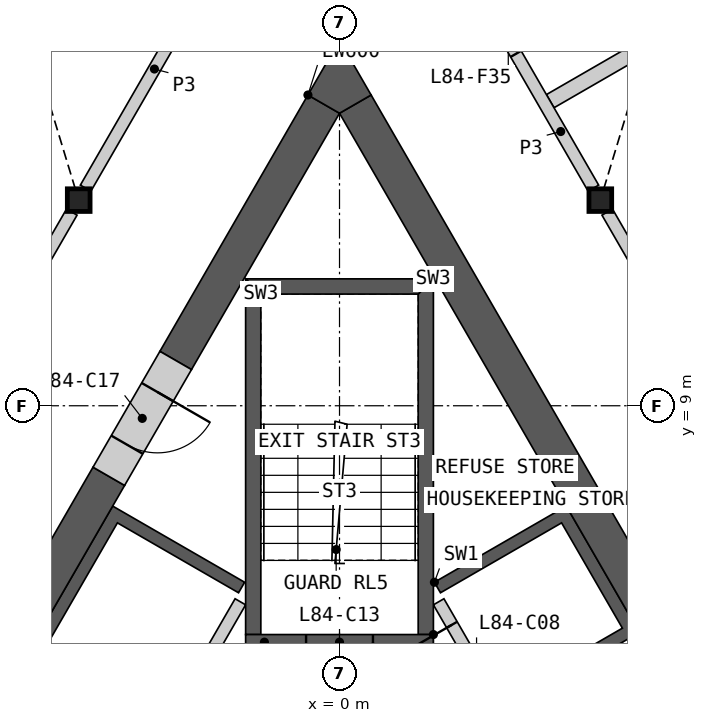
"""IFC4 building model, lengths in metres.
Left out: names, types, materials, properties, quantities, classifications, styles, units other than length and angle.
Written with IfcOpenShell. Run it as: python <this file> out.ifc"""

import sys

from ifc_helpers import new_model, si_unit, direction, frame, frame_2d, origin, origin_2d, place, context, subcontext, project, spatial, polyline, rectangle, i_section, outline, extrude, element, fill, save


model = new_model("IFC4")
c1 = context("Model", 3, precision=1e-05, world=origin(), true_north=direction((0.0, 1.0)))
c2 = subcontext(c1, "Body", "Model", "MODEL_VIEW")
j1 = project(units=[si_unit("LENGTHUNIT", "METRE"), si_unit("PLANEANGLEUNIT", "RADIAN")], contexts=[c1])
p1 = place(None, origin())
s1 = spatial("IfcSite", under=j1, at=p1, CompositionType="ELEMENT")
p2 = place(p1, origin())
s2 = spatial("IfcBuilding", under=s1, at=p2, CompositionType="ELEMENT")
p3 = place(p2, frame((0.0, 0.0, 374.6)))
s3 = spatial("IfcBuildingStorey", under=s2, at=p3, CompositionType="ELEMENT", Elevation=374.6)
for number, where, z_axis, x_axis in (
    (1, (-4.289, 12.382, 0.0), (0.0, 0.0, 1.0), (1.0, 0.0, 0.0)),
    (2, (4.289, 12.382, 0.0), (0.0, 0.0, 1.0), (1.0, 0.0, 0.0)),
):
    element("IfcColumn", number, at=place(p3, frame(where, z_axis=z_axis, x_axis=x_axis)), inside=s3, PredefinedType="COLUMN", context=c2, shape_type="SweptSolid", body=[
        extrude(i_section(OverallWidth=0.374, OverallDepth=0.372, WebThickness=0.016, FlangeThickness=0.026, at=origin_2d()), origin(), (0.0, 0.0, 1.0), 3.4),
    ])
p4 = place(p3, origin())
e3 = element("IfcWall", 3, at=p4, inside=s3, PredefinedType="SHEAR", context=c2, shape_type="SweptSolid", body=[
    extrude(outline(polyline([(1.561, 6.097), (3.731, 7.35), (8.231, -0.444), (6.061, -1.697), (5.96, -1.524), (7.952, -0.374), (6.952, 1.358), (4.96, 0.208), (4.861, 0.381), (6.852, 1.531), (5.852, 3.263), (3.861, 2.113), (3.76, 2.287), (5.752, 3.437), (4.752, 5.169), (2.76, 4.019), (2.66, 4.192), (4.652, 5.342), (3.652, 7.074), (1.66, 5.924), (1.561, 6.097)])), origin(), (0.0, 0.0, 1.0), 3.1),
])
p5 = place(p3, frame((5.817, -1.476, 0.0), z_axis=(0.0, 0.0, 1.0), x_axis=(-0.500002616675, 0.866023893041, 0.0)))
e4 = element("IfcWall", 4, at=p5, inside=s3, PredefinedType="SOLIDWALL", context=c2, shape_type="SweptSolid", body=[
    extrude(rectangle(XDim=8.373, YDim=0.2, at=frame_2d((4.187, 0.0))), origin(), (0.0, 0.0, 1.0), 3.1),
])
p6 = place(p5, frame((0.337, 0.0, 0.0)))
e5 = element("IfcOpeningElement", 5, at=p6, cuts=e4, PredefinedType="OPENING", context=c2, shape_type="SweptSolid", body=[
    extrude(rectangle(XDim=1.1, YDim=2.1, at=frame_2d((0.55, 1.05))), frame((0.0, 0.11, 0.0), z_axis=(0.0, -1.0, 0.0), x_axis=(1.0, 0.0, 0.0)), (0.0, 0.0, 1.0), 0.22),
])
p7 = place(p5, frame((2.537, 0.0, 0.0)))
e6 = element("IfcOpeningElement", 6, at=p7, cuts=e4, PredefinedType="OPENING", context=c2, shape_type="SweptSolid", body=[
    extrude(rectangle(XDim=1.1, YDim=2.1, at=frame_2d((0.55, 1.05))), frame((0.0, 0.11, 0.0), z_axis=(0.0, -1.0, 0.0), x_axis=(1.0, 0.0, 0.0)), (0.0, 0.0, 1.0), 0.22),
])
p8 = place(p5, frame((4.737, 0.0, 0.0)))
e7 = element("IfcOpeningElement", 7, at=p8, cuts=e4, PredefinedType="OPENING", context=c2, shape_type="SweptSolid", body=[
    extrude(rectangle(XDim=1.1, YDim=2.1, at=frame_2d((0.55, 1.05))), frame((0.0, 0.11, 0.0), z_axis=(0.0, -1.0, 0.0), x_axis=(1.0, 0.0, 0.0)), (0.0, 0.0, 1.0), 0.22),
])
p9 = place(p5, frame((7.037, 0.0, 0.0)))
e8 = element("IfcOpeningElement", 8, at=p9, cuts=e4, PredefinedType="OPENING", context=c2, shape_type="SweptSolid", body=[
    extrude(rectangle(XDim=0.9, YDim=2.1, at=frame_2d((0.45, 1.05))), frame((0.0, 0.11, 0.0), z_axis=(0.0, -1.0, 0.0), x_axis=(1.0, 0.0, 0.0)), (0.0, 0.0, 1.0), 0.22),
])
p10 = place(p3, origin())
e9 = element("IfcWall", 9, at=p10, inside=s3, PredefinedType="SHEAR", context=c2, shape_type="SweptSolid", body=[
    extrude(outline(polyline([(-4.96, 0.208), (-7.131, 1.461), (-3.731, 7.35), (-1.561, 6.097), (-1.66, 5.924), (-3.652, 7.074), (-6.852, 1.531), (-4.861, 0.381), (-4.96, 0.208)])), origin(), (0.0, 0.0, 1.0), 3.1),
])
p11 = place(p3, frame((-1.631, 5.776, 0.0), z_axis=(0.0, 0.0, 1.0), x_axis=(-0.499992876559, -0.866029516466, 0.0)))
e10 = element("IfcWall", 10, at=p11, inside=s3, PredefinedType="SOLIDWALL", context=c2, shape_type="SweptSolid", body=[
    extrude(rectangle(XDim=6.486, YDim=0.2, at=frame_2d((3.243, 0.0))), origin(), (0.0, 0.0, 1.0), 3.1),
])
p12 = place(p11, frame((2.637, 0.0, 0.0)))
e11 = element("IfcOpeningElement", 11, at=p12, cuts=e10, PredefinedType="OPENING", context=c2, shape_type="SweptSolid", body=[
    extrude(rectangle(XDim=0.9, YDim=2.1, at=frame_2d((0.45, 1.05))), frame((0.0, 0.11, 0.0), z_axis=(0.0, -1.0, 0.0), x_axis=(1.0, 0.0, 0.0)), (0.0, 0.0, 1.0), 0.22),
])
p13 = place(p3, origin())
e12 = element("IfcWall", 12, at=p13, inside=s3, PredefinedType="SHEAR", context=c2, shape_type="SweptSolid", body=[
    extrude(outline(polyline([(1.544, 5.237), (1.544, 11.087), (1.294, 10.837), (1.294, 5.237), (1.544, 5.237)])), origin(), (0.0, 0.0, 1.0), 3.1),
])
p14 = place(p3, origin())
e13 = element("IfcWall", 13, at=p14, inside=s3, PredefinedType="SHEAR", context=c2, shape_type="SweptSolid", body=[
    extrude(outline(polyline([(1.544, 11.087), (-1.544, 11.087), (-1.294, 10.837), (1.294, 10.837), (1.544, 11.087)])), origin(), (0.0, 0.0, 1.0), 3.1),
])
p15 = place(p3, origin())
e14 = element("IfcWall", 14, at=p15, inside=s3, PredefinedType="SHEAR", context=c2, shape_type="SweptSolid", body=[
    extrude(outline(polyline([(-1.294, 10.837), (-1.544, 11.087), (-1.544, 5.237), (-1.294, 5.237), (-1.294, 10.837)])), origin(), (0.0, 0.0, 1.0), 3.1),
])
p16 = place(p3, frame((1.544, 5.112, 0.0), z_axis=(0.0, 0.0, 1.0), x_axis=(-1.0, 0.0, 0.0)))
e15 = element("IfcWall", 15, at=p16, inside=s3, PredefinedType="SHEAR", context=c2, shape_type="SweptSolid", body=[
    extrude(rectangle(XDim=3.088, YDim=0.25, at=frame_2d((1.544, 0.0))), origin(), (0.0, 0.0, 1.0), 3.1),
])
p17 = place(p16, frame((0.994, 0.0, 0.0)))
e16 = element("IfcOpeningElement", 16, at=p17, cuts=e15, PredefinedType="OPENING", context=c2, shape_type="SweptSolid", body=[
    extrude(rectangle(XDim=1.1, YDim=2.1, at=frame_2d((0.55, 1.05))), frame((0.0, 0.135, 0.0), z_axis=(0.0, -1.0, 0.0), x_axis=(1.0, 0.0, 0.0)), (0.0, 0.0, 1.0), 0.27),
])
p18 = place(p3, frame((8.686, -0.634, 0.0), z_axis=(0.0, 0.0, 1.0), x_axis=(-0.500004601921, 0.866022746848, 0.0)))
e17 = element("IfcWall", 17, at=p18, inside=s3, PredefinedType="SHEAR", context=c2, shape_type="SweptSolid", body=[
    extrude(rectangle(XDim=16.853, YDim=0.6, at=frame_2d((8.426, 0.0))), origin(), (0.0, 0.0, 1.0), 3.1),
])
p19 = place(p3, frame((-3.794, 7.84, 0.0), z_axis=(0.0, 0.0, 1.0), x_axis=(-0.499974747889, -0.866039982607, 0.0)))
e18 = element("IfcWall", 18, at=p19, inside=s3, PredefinedType="SHEAR", context=c2, shape_type="SweptSolid", body=[
    extrude(rectangle(XDim=7.092, YDim=0.6, at=frame_2d((3.546, 0.0))), origin(), (0.0, 0.0, 1.0), 3.1),
])
p20 = place(p3, frame((-0.26, 13.961, 0.0), z_axis=(0.0, 0.0, 1.0), x_axis=(-0.50000604952, -0.866021911064, 0.0)))
e19 = element("IfcWall", 19, at=p20, inside=s3, PredefinedType="SHEAR", context=c2, shape_type="SweptSolid", body=[
    extrude(rectangle(XDim=4.869, YDim=0.6, at=frame_2d((2.434, 0.0))), origin(), (0.0, 0.0, 1.0), 3.1),
])
p21 = place(p3, origin())
e20 = element("IfcWall", 20, at=p21, inside=s3, PredefinedType="SHEAR", context=c2, shape_type="SweptSolid", body=[
    extrude(outline(polyline([(-0.52, 14.111), (0.0, 15.011), (0.52, 14.111), (0.0, 13.811), (-0.52, 14.111)])), origin(), (0.0, 0.0, 1.0), 3.1),
])
p22 = place(p3, frame((-2.694, 9.745, 0.0), z_axis=(0.0, 0.0, 1.0), x_axis=(-0.50002983664, -0.866008176907, 0.0)))
e21 = element("IfcWall", 21, at=p22, inside=s3, PredefinedType="SHEAR", context=c2, shape_type="SweptSolid", body=[
    extrude(rectangle(XDim=2.2, YDim=0.6, at=frame_2d((1.1, 0.0))), origin(), (0.0, 0.0, 1.0), 3.1),
])
p23 = place(p22, frame((0.6, 0.0, 0.0)))
e22 = element("IfcOpeningElement", 22, at=p23, cuts=e21, PredefinedType="OPENING", context=c2, shape_type="SweptSolid", body=[
    extrude(rectangle(XDim=1.0, YDim=2.1, at=frame_2d((0.5, 1.05))), frame((0.0, 0.31, 0.0), z_axis=(0.0, -1.0, 0.0), x_axis=(1.0, 0.0, 0.0)), (0.0, 0.0, 1.0), 0.62),
])
p24 = place(p3, frame((3.465, 14.01, 0.0), z_axis=(0.0, 0.0, 1.0), x_axis=(0.866032376801, 0.499987922186, 0.0)))
e23 = element("IfcWall", 23, at=p24, inside=s3, PredefinedType="PARTITIONING", context=c2, shape_type="SweptSolid", body=[
    extrude(rectangle(XDim=11.782, YDim=0.25, at=frame_2d((5.891, 0.0))), origin(), (0.0, 0.0, 1.0), 2.33),
])
p25 = place(p3, frame((4.403, 12.185, 0.0), z_axis=(0.0, 0.0, 1.0), x_axis=(0.499992155518, -0.866029932751, 0.0)))
e24 = element("IfcWall", 24, at=p25, inside=s3, PredefinedType="PARTITIONING", context=c2, shape_type="SweptSolid", body=[
    extrude(rectangle(XDim=8.123, YDim=0.2, at=frame_2d((4.062, 0.0))), origin(), (0.0, 0.0, 1.0), 3.1),
])
p26 = place(p25, frame((3.963, 0.0, 0.0)))
e25 = element("IfcOpeningElement", 25, at=p26, cuts=e24, PredefinedType="OPENING", context=c2, shape_type="SweptSolid", body=[
    extrude(rectangle(XDim=1.0, YDim=2.1, at=frame_2d((0.5, 1.05))), frame((0.0, 0.11, 0.0), z_axis=(0.0, -1.0, 0.0), x_axis=(1.0, 0.0, 0.0)), (0.0, 0.0, 1.0), 0.22),
])
p27 = place(p3, frame((-8.465, 5.15, 0.0), z_axis=(0.0, 0.0, 1.0), x_axis=(0.499992155518, 0.866029932751, 0.0)))
e26 = element("IfcWall", 26, at=p27, inside=s3, PredefinedType="PARTITIONING", context=c2, shape_type="SweptSolid", body=[
    extrude(rectangle(XDim=8.123, YDim=0.2, at=frame_2d((4.062, 0.0))), origin(), (0.0, 0.0, 1.0), 3.1),
])
p28 = place(p27, frame((3.587, 0.0, 0.0)))
e27 = element("IfcOpeningElement", 27, at=p28, cuts=e26, PredefinedType="OPENING", context=c2, shape_type="SweptSolid", body=[
    extrude(rectangle(XDim=0.95, YDim=2.1, at=frame_2d((0.475, 1.05))), frame((0.0, 0.11, 0.0), z_axis=(0.0, -1.0, 0.0), x_axis=(1.0, 0.0, 0.0)), (0.0, 0.0, 1.0), 0.22),
])
p29 = place(p3, frame((-4.176, 12.579, 0.0), z_axis=(0.0, 0.0, 1.0), x_axis=(0.499974648164, 0.866040040179, 0.0)))
e28 = element("IfcWall", 28, at=p29, inside=s3, PredefinedType="PARTITIONING", context=c2, shape_type="SweptSolid", body=[
    extrude(rectangle(XDim=4.525, YDim=0.2, at=frame_2d((2.263, 0.0))), origin(), (0.0, 0.0, 1.0), 3.1),
])
p30 = place(p3, frame((2.025, 16.303, 0.0), z_axis=(0.0, 0.0, 1.0), x_axis=(0.500004215162, -0.866022970146, 0.0)))
e29 = element("IfcWall", 29, at=p30, inside=s3, PredefinedType="PARTITIONING", context=c2, shape_type="SweptSolid", body=[
    extrude(rectangle(XDim=4.3, YDim=0.2, at=frame_2d((2.15, 0.0))), origin(), (0.0, 0.0, 1.0), 3.1),
])
p31 = place(p30, frame((0.75, 0.0, 0.0)))
e30 = element("IfcOpeningElement", 30, at=p31, cuts=e29, PredefinedType="OPENING", context=c2, shape_type="SweptSolid", body=[
    extrude(rectangle(XDim=1.0, YDim=2.1, at=frame_2d((0.5, 1.05))), frame((0.0, 0.11, 0.0), z_axis=(0.0, -1.0, 0.0), x_axis=(1.0, 0.0, 0.0)), (0.0, 0.0, 1.0), 0.22),
])
p32 = place(p3, frame((-11.473, 6.74, 0.0), z_axis=(0.0, 0.0, 1.0), x_axis=(0.500001082559, 0.866024778768, 0.0)))
e31 = element("IfcWall", 31, at=p32, inside=s3, PredefinedType="PARTITIONING", context=c2, shape_type="SweptSolid", body=[
    extrude(rectangle(XDim=15.094, YDim=0.2, at=frame_2d((7.547, 0.0))), origin(), (0.0, 0.0, 1.0), 2.33),
])
p33 = place(p32, frame((10.383, 0.0, 0.0)))
e32 = element("IfcOpeningElement", 32, at=p33, cuts=e31, PredefinedType="OPENING", context=c2, shape_type="SweptSolid", body=[
    extrude(rectangle(XDim=0.95, YDim=2.1, at=frame_2d((0.475, 1.05))), frame((0.0, 0.11, 0.0), z_axis=(0.0, -1.0, 0.0), x_axis=(1.0, 0.0, 0.0)), (0.0, 0.0, 1.0), 0.22),
])
p34 = place(p9, origin())
e33 = element("IfcDoor", 33, at=p34, inside=s3, OperationType="SINGLE_SWING_RIGHT", PredefinedType="DOOR", context=c2, shape_type="SweptSolid", body=[
    extrude(rectangle(XDim=0.9, YDim=2.1, at=frame_2d((0.45, 1.05))), frame((0.0, 0.025, 0.0), z_axis=(0.0, -1.0, 0.0), x_axis=(1.0, 0.0, 0.0)), (0.0, 0.0, 1.0), 0.05),
])
fill(e8, e33)
p35 = place(p17, origin())
e34 = element("IfcDoor", 34, at=p35, inside=s3, OperationType="SINGLE_SWING_LEFT", PredefinedType="DOOR", context=c2, shape_type="SweptSolid", body=[
    extrude(rectangle(XDim=1.1, YDim=2.1, at=frame_2d((0.55, 1.05))), frame((0.0, 0.025, 0.0), z_axis=(0.0, -1.0, 0.0), x_axis=(1.0, 0.0, 0.0)), (0.0, 0.0, 1.0), 0.05),
])
fill(e16, e34)
p36 = place(p23, origin())
e35 = element("IfcDoor", 35, at=p36, inside=s3, OperationType="SINGLE_SWING_LEFT", PredefinedType="DOOR", context=c2, shape_type="SweptSolid", body=[
    extrude(rectangle(XDim=1.0, YDim=2.1, at=frame_2d((0.5, 1.05))), frame((0.0, 0.055, 0.0), z_axis=(0.0, -1.0, 0.0), x_axis=(1.0, 0.0, 0.0)), (0.0, 0.0, 1.0), 0.05),
])
fill(e22, e35)
p37 = place(p31, origin())
e36 = element("IfcDoor", 36, at=p37, inside=s3, OperationType="SINGLE_SWING_LEFT", PredefinedType="DOOR", context=c2, shape_type="SweptSolid", body=[
    extrude(rectangle(XDim=1.0, YDim=2.1, at=frame_2d((0.5, 1.05))), frame((0.0, 0.025, 0.0), z_axis=(0.0, -1.0, 0.0), x_axis=(1.0, 0.0, 0.0)), (0.0, 0.0, 1.0), 0.05),
])
fill(e30, e36)
save(model, sys.argv[1])
